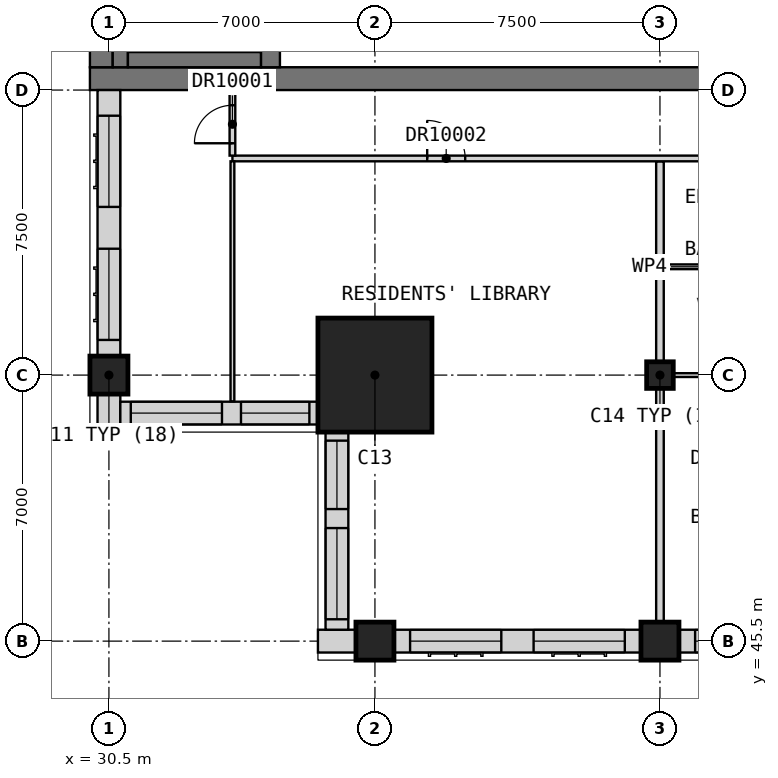
"""IFC4 building model, lengths in metres.
Left out: names, types, materials, properties, quantities, classifications, styles, units other than length and angle.
Written with IfcOpenShell. Run it as: python <this file> out.ifc"""

import sys

from ifc_helpers import new_model, si_unit, direction, frame, frame_2d, origin, origin_2d, place, context, subcontext, project, spatial, rectangle, extrude, element, fill, save


model = new_model("IFC4")
c1 = context("Model", 3, precision=1e-05, world=origin(), true_north=direction((0.0, 1.0)))
c2 = subcontext(c1, "Body", "Model", "MODEL_VIEW")
j1 = project(units=[si_unit("LENGTHUNIT", "METRE"), si_unit("PLANEANGLEUNIT", "RADIAN")], contexts=[c1])
p1 = place(None, origin())
s1 = spatial("IfcSite", under=j1, at=p1, CompositionType="ELEMENT")
p2 = place(p1, origin())
s2 = spatial("IfcBuilding", under=s1, at=p2, CompositionType="ELEMENT")
p3 = place(p2, frame((0.0, 0.0, 273.2)))
s3 = spatial("IfcBuildingStorey", under=s2, at=p3, CompositionType="ELEMENT", Elevation=273.2)
for number, where, z_axis, x_axis in (
    (1, (30.5, 52.5, 0.0), (0.0, 0.0, 1.0), (1.0, 0.0, 0.0)),
    (2, (37.5, 45.5, 0.0), (0.0, 0.0, 1.0), (1.0, 0.0, 0.0)),
    (3, (45.0, 45.5, 0.0), (0.0, 0.0, 1.0), (1.0, 0.0, 0.0)),
):
    element("IfcColumn", number, at=place(p3, frame(where, z_axis=z_axis, x_axis=x_axis)), inside=s3, PredefinedType="COLUMN", context=c2, shape_type="SweptSolid", body=[
        extrude(rectangle(XDim=1.0, YDim=1.0, at=origin_2d()), origin(), (0.0, 0.0, 1.0), 3.5),
    ])
p4 = place(p3, frame((45.0, 52.5, 0.0), z_axis=(0.0, 0.0, 1.0), x_axis=(1.0, 0.0, 0.0)))
e4 = element("IfcColumn", 4, at=p4, inside=s3, PredefinedType="COLUMN", context=c2, shape_type="SweptSolid", body=[
    extrude(rectangle(XDim=0.7, YDim=0.7, at=origin_2d()), origin(), (0.0, 0.0, 1.0), 3.5),
])
p5 = place(p3, frame((37.5, 52.5, 0.0), z_axis=(0.0, 0.0, 1.0), x_axis=(1.0, 0.0, 0.0)))
e5 = element("IfcColumn", 5, at=p5, inside=s3, PredefinedType="COLUMN", context=c2, shape_type="SweptSolid", body=[
    extrude(rectangle(XDim=3.0, YDim=3.0, at=origin_2d()), origin(), (0.0, 0.0, 1.0), 3.5),
])
p6 = place(p3, frame((30.0, 60.3, 0.0), z_axis=(0.0, 0.0, 1.0), x_axis=(1.0, 0.0, 0.0)))
e6 = element("IfcWall", 6, at=p6, inside=s3, PredefinedType="SHEAR", context=c2, shape_type="SweptSolid", body=[
    extrude(rectangle(XDim=30.0, YDim=0.6, at=frame_2d((15.0, 0.0))), origin(), (0.0, 0.0, 1.0), 3.5),
])
p7 = place(p6, frame((21.9, 0.0, 0.0)))
e7 = element("IfcOpeningElement", 7, at=p7, cuts=e6, PredefinedType="OPENING", context=c2, shape_type="SweptSolid", body=[
    extrude(rectangle(XDim=1.8, YDim=2.1, at=frame_2d((0.9, 1.05))), frame((0.0, 0.31, 0.0), z_axis=(0.0, -1.0, 0.0), x_axis=(1.0, 0.0, 0.0)), (0.0, 0.0, 1.0), 0.62),
])
p8 = place(p6, frame((26.5, 0.0, 0.0)))
e8 = element("IfcOpeningElement", 8, at=p8, cuts=e6, PredefinedType="OPENING", context=c2, shape_type="SweptSolid", body=[
    extrude(rectangle(XDim=1.2, YDim=2.1, at=frame_2d((0.6, 1.05))), frame((0.0, 0.31, 0.0), z_axis=(0.0, -1.0, 0.0), x_axis=(1.0, 0.0, 0.0)), (0.0, 0.0, 1.0), 0.62),
])
p9 = place(p3, frame((30.3, 60.6, 0.0), z_axis=(0.0, 0.0, 1.0), x_axis=(0.0, 1.0, 0.0)))
e9 = element("IfcWall", 9, at=p9, inside=s3, PredefinedType="SHEAR", context=c2, shape_type="SweptSolid", body=[
    extrude(rectangle(XDim=21.3, YDim=0.6, at=frame_2d((10.65, 0.0))), origin(), (0.0, 0.0, 1.0), 3.5),
])
p10 = place(p3, frame((34.75, 60.6, 0.0), z_axis=(0.0, 0.0, 1.0), x_axis=(0.0, 1.0, 0.0)))
e10 = element("IfcWall", 10, at=p10, inside=s3, PredefinedType="SHEAR", context=c2, shape_type="SweptSolid", body=[
    extrude(rectangle(XDim=3.6, YDim=0.5, at=frame_2d((1.8, 0.0))), origin(), (0.0, 0.0, 1.0), 3.5),
])
p11 = place(p3, frame((36.0, 45.5, 0.0), z_axis=(0.0, 0.0, 1.0), x_axis=(1.0, 0.0, 0.0)))
e11 = element("IfcWall", 11, at=p11, inside=s3, PredefinedType="SOLIDWALL", context=c2, shape_type="SweptSolid", body=[
    extrude(rectangle(XDim=1.0, YDim=0.6, at=frame_2d((0.5, 0.0))), origin(), (0.0, 0.0, 1.0), 3.25),
])
p12 = place(p3, frame((38.0, 45.5, 0.0), z_axis=(0.0, 0.0, 1.0), x_axis=(1.0, 0.0, 0.0)))
e12 = element("IfcWall", 12, at=p12, inside=s3, PredefinedType="SOLIDWALL", context=c2, shape_type="SweptSolid", body=[
    extrude(rectangle(XDim=6.5, YDim=0.6, at=frame_2d((3.25, 0.0))), origin(), (0.0, 0.0, 1.0), 2.75),
])
p13 = place(p12, frame((0.425, 0.0, 0.8)))
e13 = element("IfcOpeningElement", 13, at=p13, cuts=e12, PredefinedType="OPENING", context=c2, shape_type="SweptSolid", body=[
    extrude(rectangle(XDim=2.4, YDim=1.8, at=frame_2d((1.2, 0.9))), frame((0.0, 0.31, 0.0), z_axis=(0.0, -1.0, 0.0), x_axis=(1.0, 0.0, 0.0)), (0.0, 0.0, 1.0), 0.62),
])
p14 = place(p12, frame((3.675, 0.0, 0.8)))
e14 = element("IfcOpeningElement", 14, at=p14, cuts=e12, PredefinedType="OPENING", context=c2, shape_type="SweptSolid", body=[
    extrude(rectangle(XDim=2.4, YDim=1.8, at=frame_2d((1.2, 0.9))), frame((0.0, 0.31, 0.0), z_axis=(0.0, -1.0, 0.0), x_axis=(1.0, 0.0, 0.0)), (0.0, 0.0, 1.0), 0.62),
])
p15 = place(p3, frame((45.5, 45.5, 0.0), z_axis=(0.0, 0.0, 1.0), x_axis=(1.0, 0.0, 0.0)))
e15 = element("IfcWall", 15, at=p15, inside=s3, PredefinedType="SOLIDWALL", context=c2, shape_type="SweptSolid", body=[
    extrude(rectangle(XDim=6.5, YDim=0.6, at=frame_2d((3.25, 0.0))), origin(), (0.0, 0.0, 1.0), 2.75),
])
p16 = place(p15, frame((0.425, 0.0, 0.8)))
e16 = element("IfcOpeningElement", 16, at=p16, cuts=e15, PredefinedType="OPENING", context=c2, shape_type="SweptSolid", body=[
    extrude(rectangle(XDim=2.4, YDim=1.8, at=frame_2d((1.2, 0.9))), frame((0.0, 0.31, 0.0), z_axis=(0.0, -1.0, 0.0), x_axis=(1.0, 0.0, 0.0)), (0.0, 0.0, 1.0), 0.62),
])
p17 = place(p15, frame((3.675, 0.0, 0.8)))
e17 = element("IfcOpeningElement", 17, at=p17, cuts=e15, PredefinedType="OPENING", context=c2, shape_type="SweptSolid", body=[
    extrude(rectangle(XDim=2.4, YDim=1.8, at=frame_2d((1.2, 0.9))), frame((0.0, 0.31, 0.0), z_axis=(0.0, -1.0, 0.0), x_axis=(1.0, 0.0, 0.0)), (0.0, 0.0, 1.0), 0.62),
])
p18 = place(p3, frame((30.5, 60.0, 0.0), z_axis=(0.0, 0.0, 1.0), x_axis=(0.0, -1.0, 0.0)))
e18 = element("IfcWall", 18, at=p18, inside=s3, PredefinedType="SOLIDWALL", context=c2, shape_type="SweptSolid", body=[
    extrude(rectangle(XDim=7.0, YDim=0.6, at=frame_2d((3.5, 0.0))), origin(), (0.0, 0.0, 1.0), 3.25),
])
p19 = place(p18, frame((4.175, 0.0, 0.8)))
e19 = element("IfcOpeningElement", 19, at=p19, cuts=e18, PredefinedType="OPENING", context=c2, shape_type="SweptSolid", body=[
    extrude(rectangle(XDim=2.4, YDim=1.8, at=frame_2d((1.2, 0.9))), frame((0.0, 0.31, 0.0), z_axis=(0.0, -1.0, 0.0), x_axis=(1.0, 0.0, 0.0)), (0.0, 0.0, 1.0), 0.62),
])
p20 = place(p18, frame((0.675, 0.0, 0.8)))
e20 = element("IfcOpeningElement", 20, at=p20, cuts=e18, PredefinedType="OPENING", context=c2, shape_type="SweptSolid", body=[
    extrude(rectangle(XDim=2.4, YDim=1.8, at=frame_2d((1.2, 0.9))), frame((0.0, 0.31, 0.0), z_axis=(0.0, -1.0, 0.0), x_axis=(1.0, 0.0, 0.0)), (0.0, 0.0, 1.0), 0.62),
])
p21 = place(p3, frame((30.5, 52.0, 0.0), z_axis=(0.0, 0.0, 1.0), x_axis=(0.0, -1.0, 0.0)))
e21 = element("IfcWall", 21, at=p21, inside=s3, PredefinedType="SOLIDWALL", context=c2, shape_type="SweptSolid", body=[
    extrude(rectangle(XDim=1.0, YDim=0.6, at=frame_2d((0.5, 0.0))), origin(), (0.0, 0.0, 1.0), 3.25),
])
p22 = place(p3, frame((30.8, 51.5, 0.0), z_axis=(0.0, 0.0, 1.0), x_axis=(1.0, 0.0, 0.0)))
e22 = element("IfcWall", 22, at=p22, inside=s3, PredefinedType="SOLIDWALL", context=c2, shape_type="SweptSolid", body=[
    extrude(rectangle(XDim=5.2, YDim=0.6, at=frame_2d((2.6, 0.0))), origin(), (0.0, 0.0, 1.0), 3.25),
])
p23 = place(p22, frame((0.275, 0.0, 0.8)))
e23 = element("IfcOpeningElement", 23, at=p23, cuts=e22, PredefinedType="OPENING", context=c2, shape_type="SweptSolid", body=[
    extrude(rectangle(XDim=2.4, YDim=1.8, at=frame_2d((1.2, 0.9))), frame((0.0, 0.31, 0.0), z_axis=(0.0, -1.0, 0.0), x_axis=(1.0, 0.0, 0.0)), (0.0, 0.0, 1.0), 0.62),
])
p24 = place(p22, frame((3.175, 0.0, 0.8)))
e24 = element("IfcOpeningElement", 24, at=p24, cuts=e22, PredefinedType="OPENING", context=c2, shape_type="SweptSolid", body=[
    extrude(rectangle(XDim=1.8, YDim=1.8, at=frame_2d((0.9, 0.9))), frame((0.0, 0.31, 0.0), z_axis=(0.0, -1.0, 0.0), x_axis=(1.0, 0.0, 0.0)), (0.0, 0.0, 1.0), 0.62),
])
p25 = place(p3, frame((36.5, 51.0, 0.0), z_axis=(0.0, 0.0, 1.0), x_axis=(0.0, -1.0, 0.0)))
e25 = element("IfcWall", 25, at=p25, inside=s3, PredefinedType="SOLIDWALL", context=c2, shape_type="SweptSolid", body=[
    extrude(rectangle(XDim=5.2, YDim=0.6, at=frame_2d((2.6, 0.0))), origin(), (0.0, 0.0, 1.0), 3.25),
])
p26 = place(p25, frame((2.525, 0.0, 0.8)))
e26 = element("IfcOpeningElement", 26, at=p26, cuts=e25, PredefinedType="OPENING", context=c2, shape_type="SweptSolid", body=[
    extrude(rectangle(XDim=2.4, YDim=1.8, at=frame_2d((1.2, 0.9))), frame((0.0, 0.31, 0.0), z_axis=(0.0, -1.0, 0.0), x_axis=(1.0, 0.0, 0.0)), (0.0, 0.0, 1.0), 0.62),
])
p27 = place(p25, frame((0.225, 0.0, 0.8)))
e27 = element("IfcOpeningElement", 27, at=p27, cuts=e25, PredefinedType="OPENING", context=c2, shape_type="SweptSolid", body=[
    extrude(rectangle(XDim=1.8, YDim=1.8, at=frame_2d((0.9, 0.9))), frame((0.0, 0.31, 0.0), z_axis=(0.0, -1.0, 0.0), x_axis=(1.0, 0.0, 0.0)), (0.0, 0.0, 1.0), 0.62),
])
p28 = place(p3, frame((30.8, 60.6, 0.0), z_axis=(0.0, 0.0, 1.0), x_axis=(0.0, 1.0, 0.0)))
e28 = element("IfcWall", 28, at=p28, inside=s3, PredefinedType="SOLIDWALL", context=c2, shape_type="SweptSolid", body=[
    extrude(rectangle(XDim=21.3, YDim=0.4, at=frame_2d((10.65, 0.0))), origin(), (0.0, 0.0, 1.0), 3.25),
])
p29 = place(p3, frame((31.0, 60.8, 0.0), z_axis=(0.0, 0.0, 1.0), x_axis=(1.0, 0.0, 0.0)))
e29 = element("IfcWall", 29, at=p29, inside=s3, PredefinedType="SOLIDWALL", context=c2, shape_type="SweptSolid", body=[
    extrude(rectangle(XDim=3.5, YDim=0.4, at=frame_2d((1.75, 0.0))), origin(), (0.0, 0.0, 1.0), 3.25),
])
p30 = place(p3, frame((45.0, 45.0, 0.0), z_axis=(0.0, 0.0, 1.0), x_axis=(0.0, 1.0, 0.0)))
e30 = element("IfcWall", 30, at=p30, inside=s3, PredefinedType="PARTITIONING", context=c2, shape_type="SweptSolid", body=[
    extrude(rectangle(XDim=13.125, YDim=0.2, at=frame_2d((6.562, 0.0))), origin(), (0.0, 0.0, 1.0), 3.25),
])
p31 = place(p3, frame((33.75, 58.2, 0.0), z_axis=(0.0, 0.0, 1.0), x_axis=(1.0, 0.0, 0.0)))
e31 = element("IfcWall", 31, at=p31, inside=s3, PredefinedType="PARTITIONING", context=c2, shape_type="SweptSolid", body=[
    extrude(rectangle(XDim=28.05, YDim=0.15, at=frame_2d((14.025, 0.0))), origin(), (0.0, 0.0, 1.0), 3.25),
])
p32 = place(p31, frame((5.125, 0.0, 0.0)))
e32 = element("IfcOpeningElement", 32, at=p32, cuts=e31, PredefinedType="OPENING", context=c2, shape_type="SweptSolid", body=[
    extrude(rectangle(XDim=1.0, YDim=2.1, at=frame_2d((0.5, 1.05))), frame((0.0, 0.085, 0.0), z_axis=(0.0, -1.0, 0.0), x_axis=(1.0, 0.0, 0.0)), (0.0, 0.0, 1.0), 0.17),
])
p33 = place(p31, frame((16.425, 0.0, 0.0)))
e33 = element("IfcOpeningElement", 33, at=p33, cuts=e31, PredefinedType="OPENING", context=c2, shape_type="SweptSolid", body=[
    extrude(rectangle(XDim=0.9, YDim=2.1, at=frame_2d((0.45, 1.05))), frame((0.0, 0.085, 0.0), z_axis=(0.0, -1.0, 0.0), x_axis=(1.0, 0.0, 0.0)), (0.0, 0.0, 1.0), 0.17),
])
p34 = place(p31, frame((26.65, 0.0, 0.0)))
e34 = element("IfcOpeningElement", 34, at=p34, cuts=e31, PredefinedType="OPENING", context=c2, shape_type="SweptSolid", body=[
    extrude(rectangle(XDim=1.0, YDim=2.1, at=frame_2d((0.5, 1.05))), frame((0.0, 0.085, 0.0), z_axis=(0.0, -1.0, 0.0), x_axis=(1.0, 0.0, 0.0)), (0.0, 0.0, 1.0), 0.17),
])
p35 = place(p3, frame((33.75, 58.275, 0.0), z_axis=(0.0, 0.0, 1.0), x_axis=(0.0, 1.0, 0.0)))
e35 = element("IfcWall", 35, at=p35, inside=s3, PredefinedType="PARTITIONING", context=c2, shape_type="SweptSolid", body=[
    extrude(rectangle(XDim=1.725, YDim=0.15, at=frame_2d((0.863, 0.0))), origin(), (0.0, 0.0, 1.0), 3.25),
])
p36 = place(p35, frame((0.325, 0.0, 0.0)))
e36 = element("IfcOpeningElement", 36, at=p36, cuts=e35, PredefinedType="OPENING", context=c2, shape_type="SweptSolid", body=[
    extrude(rectangle(XDim=1.0, YDim=2.1, at=frame_2d((0.5, 1.05))), frame((0.0, 0.085, 0.0), z_axis=(0.0, -1.0, 0.0), x_axis=(1.0, 0.0, 0.0)), (0.0, 0.0, 1.0), 0.17),
])
p37 = place(p3, frame((45.1, 52.5, 0.0), z_axis=(0.0, 0.0, 1.0), x_axis=(1.0, 0.0, 0.0)))
e37 = element("IfcWall", 37, at=p37, inside=s3, PredefinedType="PARTITIONING", context=c2, shape_type="SweptSolid", body=[
    extrude(rectangle(XDim=14.8, YDim=0.1, at=frame_2d((7.4, 0.0))), origin(), (0.0, 0.0, 1.0), 3.25),
])
p38 = place(p37, frame((1.325, 0.0, 0.0)))
e38 = element("IfcOpeningElement", 38, at=p38, cuts=e37, PredefinedType="OPENING", context=c2, shape_type="SweptSolid", body=[
    extrude(rectangle(XDim=0.9, YDim=2.1, at=frame_2d((0.45, 1.05))), frame((0.0, 0.06, 0.0), z_axis=(0.0, -1.0, 0.0), x_axis=(1.0, 0.0, 0.0)), (0.0, 0.0, 1.0), 0.12),
])
p39 = place(p37, frame((5.075, 0.0, 0.0)))
e39 = element("IfcOpeningElement", 39, at=p39, cuts=e37, PredefinedType="OPENING", context=c2, shape_type="SweptSolid", body=[
    extrude(rectangle(XDim=0.9, YDim=2.1, at=frame_2d((0.45, 1.05))), frame((0.0, 0.06, 0.0), z_axis=(0.0, -1.0, 0.0), x_axis=(1.0, 0.0, 0.0)), (0.0, 0.0, 1.0), 0.12),
])
p40 = place(p37, frame((12.575, 0.0, 0.0)))
e40 = element("IfcOpeningElement", 40, at=p40, cuts=e37, PredefinedType="OPENING", context=c2, shape_type="SweptSolid", body=[
    extrude(rectangle(XDim=0.9, YDim=2.1, at=frame_2d((0.45, 1.05))), frame((0.0, 0.06, 0.0), z_axis=(0.0, -1.0, 0.0), x_axis=(1.0, 0.0, 0.0)), (0.0, 0.0, 1.0), 0.12),
])
p41 = place(p3, frame((33.75, 51.81, 0.0), z_axis=(0.0, 0.0, 1.0), x_axis=(0.0, 1.0, 0.0)))
e41 = element("IfcWall", 41, at=p41, inside=s3, PredefinedType="PARTITIONING", context=c2, shape_type="SweptSolid", body=[
    extrude(rectangle(XDim=6.315, YDim=0.1, at=frame_2d((3.157, 0.0))), origin(), (0.0, 0.0, 1.0), 3.25),
])
p42 = place(p3, frame((45.1, 55.35, 0.0), z_axis=(0.0, 0.0, 1.0), x_axis=(1.0, 0.0, 0.0)))
e42 = element("IfcWall", 42, at=p42, inside=s3, PredefinedType="PARTITIONING", context=c2, shape_type="SweptSolid", body=[
    extrude(rectangle(XDim=3.65, YDim=0.125, at=frame_2d((1.825, 0.0))), origin(), (0.0, 0.0, 1.0), 3.25),
])
p43 = place(p42, frame((1.325, 0.0, 0.0)))
e43 = element("IfcOpeningElement", 43, at=p43, cuts=e42, PredefinedType="OPENING", context=c2, shape_type="SweptSolid", body=[
    extrude(rectangle(XDim=0.9, YDim=2.1, at=frame_2d((0.45, 1.05))), frame((0.0, 0.073, 0.0), z_axis=(0.0, -1.0, 0.0), x_axis=(1.0, 0.0, 0.0)), (0.0, 0.0, 1.0), 0.145),
])
p44 = place(p13, origin())
e44 = element("IfcWindow", 44, at=p44, inside=s3, PartitioningType="SINGLE_PANEL", PredefinedType="WINDOW", context=c2, shape_type="SweptSolid", body=[
    extrude(rectangle(XDim=2.4, YDim=1.8, at=frame_2d((1.2, 0.9))), frame((0.0, -0.07, 0.0), z_axis=(0.0, -1.0, 0.0), x_axis=(1.0, 0.0, 0.0)), (0.0, 0.0, 1.0), 0.06),
])
fill(e13, e44)
p45 = place(p14, origin())
e45 = element("IfcWindow", 45, at=p45, inside=s3, PartitioningType="SINGLE_PANEL", PredefinedType="WINDOW", context=c2, shape_type="SweptSolid", body=[
    extrude(rectangle(XDim=2.4, YDim=1.8, at=frame_2d((1.2, 0.9))), frame((0.0, -0.07, 0.0), z_axis=(0.0, -1.0, 0.0), x_axis=(1.0, 0.0, 0.0)), (0.0, 0.0, 1.0), 0.06),
])
fill(e14, e45)
p46 = place(p16, origin())
e46 = element("IfcWindow", 46, at=p46, inside=s3, PartitioningType="SINGLE_PANEL", PredefinedType="WINDOW", context=c2, shape_type="SweptSolid", body=[
    extrude(rectangle(XDim=2.4, YDim=1.8, at=frame_2d((1.2, 0.9))), frame((0.0, -0.07, 0.0), z_axis=(0.0, -1.0, 0.0), x_axis=(1.0, 0.0, 0.0)), (0.0, 0.0, 1.0), 0.06),
])
fill(e16, e46)
p47 = place(p19, origin())
e47 = element("IfcWindow", 47, at=p47, inside=s3, PartitioningType="SINGLE_PANEL", PredefinedType="WINDOW", context=c2, shape_type="SweptSolid", body=[
    extrude(rectangle(XDim=2.4, YDim=1.8, at=frame_2d((1.2, 0.9))), frame((0.0, -0.07, 0.0), z_axis=(0.0, -1.0, 0.0), x_axis=(1.0, 0.0, 0.0)), (0.0, 0.0, 1.0), 0.06),
])
fill(e19, e47)
p48 = place(p20, origin())
e48 = element("IfcWindow", 48, at=p48, inside=s3, PartitioningType="SINGLE_PANEL", PredefinedType="WINDOW", context=c2, shape_type="SweptSolid", body=[
    extrude(rectangle(XDim=2.4, YDim=1.8, at=frame_2d((1.2, 0.9))), frame((0.0, -0.07, 0.0), z_axis=(0.0, -1.0, 0.0), x_axis=(1.0, 0.0, 0.0)), (0.0, 0.0, 1.0), 0.06),
])
fill(e20, e48)
p49 = place(p23, origin())
e49 = element("IfcWindow", 49, at=p49, inside=s3, PartitioningType="SINGLE_PANEL", PredefinedType="WINDOW", context=c2, shape_type="SweptSolid", body=[
    extrude(rectangle(XDim=2.4, YDim=1.8, at=frame_2d((1.2, 0.9))), frame((0.0, -0.07, 0.0), z_axis=(0.0, -1.0, 0.0), x_axis=(1.0, 0.0, 0.0)), (0.0, 0.0, 1.0), 0.06),
])
fill(e23, e49)
p50 = place(p24, origin())
e50 = element("IfcWindow", 50, at=p50, inside=s3, PartitioningType="SINGLE_PANEL", PredefinedType="WINDOW", context=c2, shape_type="SweptSolid", body=[
    extrude(rectangle(XDim=1.8, YDim=1.8, at=frame_2d((0.9, 0.9))), frame((0.0, -0.07, 0.0), z_axis=(0.0, -1.0, 0.0), x_axis=(1.0, 0.0, 0.0)), (0.0, 0.0, 1.0), 0.06),
])
fill(e24, e50)
p51 = place(p26, origin())
e51 = element("IfcWindow", 51, at=p51, inside=s3, PartitioningType="SINGLE_PANEL", PredefinedType="WINDOW", context=c2, shape_type="SweptSolid", body=[
    extrude(rectangle(XDim=2.4, YDim=1.8, at=frame_2d((1.2, 0.9))), frame((0.0, -0.07, 0.0), z_axis=(0.0, -1.0, 0.0), x_axis=(1.0, 0.0, 0.0)), (0.0, 0.0, 1.0), 0.06),
])
fill(e26, e51)
p52 = place(p27, origin())
e52 = element("IfcWindow", 52, at=p52, inside=s3, PartitioningType="SINGLE_PANEL", PredefinedType="WINDOW", context=c2, shape_type="SweptSolid", body=[
    extrude(rectangle(XDim=1.8, YDim=1.8, at=frame_2d((0.9, 0.9))), frame((0.0, -0.07, 0.0), z_axis=(0.0, -1.0, 0.0), x_axis=(1.0, 0.0, 0.0)), (0.0, 0.0, 1.0), 0.06),
])
fill(e27, e52)
p53 = place(p36, origin())
e53 = element("IfcDoor", 53, at=p53, inside=s3, OperationType="SINGLE_SWING_RIGHT", PredefinedType="DOOR", context=c2, shape_type="SweptSolid", body=[
    extrude(rectangle(XDim=1.0, YDim=2.1, at=frame_2d((0.5, 1.05))), frame((0.0, 0.025, 0.0), z_axis=(0.0, -1.0, 0.0), x_axis=(1.0, 0.0, 0.0)), (0.0, 0.0, 1.0), 0.05),
])
fill(e36, e53)
p54 = place(p32, origin())
e54 = element("IfcDoor", 54, at=p54, inside=s3, OperationType="SINGLE_SWING_RIGHT", PredefinedType="DOOR", context=c2, shape_type="SweptSolid", body=[
    extrude(rectangle(XDim=1.0, YDim=2.1, at=frame_2d((0.5, 1.05))), frame((0.0, 0.025, 0.0), z_axis=(0.0, -1.0, 0.0), x_axis=(1.0, 0.0, 0.0)), (0.0, 0.0, 1.0), 0.05),
])
fill(e32, e54)
save(model, sys.argv[1])
